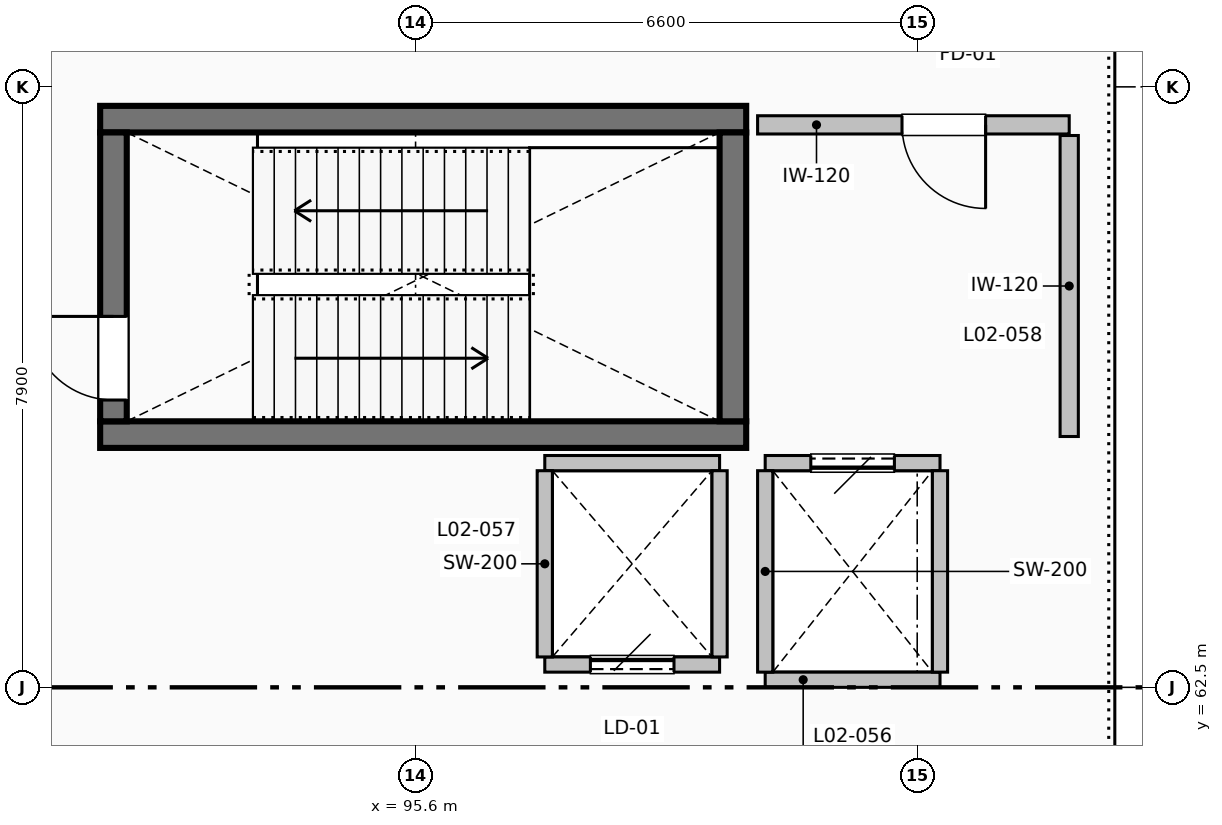
"""IFC4 building model, lengths in metres.
Left out: names, types, materials, properties, quantities, classifications, styles, units other than length and angle.
Written with IfcOpenShell. Run it as: python <this file> out.ifc"""

import sys

from ifc_helpers import new_model, si_unit, direction, frame, frame_2d, origin, place, context, subcontext, project, spatial, rectangle, extrude, element, fill, save


model = new_model("IFC4")
c1 = context("Model", 3, precision=1e-05, world=origin(), true_north=direction((0.0, 1.0)))
c2 = subcontext(c1, "Body", "Model", "MODEL_VIEW")
j1 = project(units=[si_unit("LENGTHUNIT", "METRE"), si_unit("PLANEANGLEUNIT", "RADIAN")], contexts=[c1])
p1 = place(None, origin())
s1 = spatial("IfcSite", under=j1, at=p1, CompositionType="ELEMENT")
p2 = place(p1, origin())
s2 = spatial("IfcBuilding", under=s1, at=p2, CompositionType="ELEMENT")
p3 = place(p2, frame((0.0, 0.0, 10.2)))
s3 = spatial("IfcBuildingStorey", under=s2, at=p3, CompositionType="ELEMENT", Elevation=10.2)
for number, where, z_axis, x_axis in (
    (1, (91.45, 65.825, 0.0), (0.0, 0.0, 1.0), (1.0, 0.0, 0.0)),
    (2, (99.95, 69.975, 0.0), (0.0, 0.0, 1.0), (-1.0, 0.0, 0.0)),
):
    element("IfcWall", number, at=place(p3, frame(where, z_axis=z_axis, x_axis=x_axis)), inside=s3, PredefinedType="SHEAR", context=c2, shape_type="SweptSolid", body=[
        extrude(rectangle(XDim=8.5, YDim=0.35, at=frame_2d((4.25, 0.0))), origin(), (0.0, 0.0, 1.0), 4.48),
    ])
p4 = place(p3, frame((91.625, 66.0, 0.0), z_axis=(0.0, 0.0, 1.0), x_axis=(0.0, 1.0, 0.0)))
e3 = element("IfcWall", 3, at=p4, inside=s3, PredefinedType="SHEAR", context=c2, shape_type="SweptSolid", body=[
    extrude(rectangle(XDim=3.8, YDim=0.35, at=frame_2d((1.9, 0.0))), origin(), (0.0, 0.0, 1.0), 4.48),
])
p5 = place(p4, frame((0.28, 0.0, 0.0)))
e4 = element("IfcOpeningElement", 4, at=p5, cuts=e3, PredefinedType="OPENING", context=c2, shape_type="SweptSolid", body=[
    extrude(rectangle(XDim=1.1, YDim=2.08, at=frame_2d((0.55, 1.04))), frame((0.0, 0.185, 0.0), z_axis=(0.0, -1.0, 0.0), x_axis=(1.0, 0.0, 0.0)), (0.0, 0.0, 1.0), 0.37),
])
p6 = place(p3, frame((99.775, 69.8, 0.0), z_axis=(0.0, 0.0, 1.0), x_axis=(0.0, -1.0, 0.0)))
e5 = element("IfcWall", 5, at=p6, inside=s3, PredefinedType="SHEAR", context=c2, shape_type="SweptSolid", body=[
    extrude(rectangle(XDim=3.8, YDim=0.35, at=frame_2d((1.9, 0.0))), origin(), (0.0, 0.0, 1.0), 4.48),
])
p7 = place(p3, frame((100.2, 62.6, 0.0), z_axis=(0.0, 0.0, 1.0), x_axis=(1.0, 0.0, 0.0)))
e6 = element("IfcWall", 6, at=p7, inside=s3, PredefinedType="PARTITIONING", context=c2, shape_type="SweptSolid", body=[
    extrude(rectangle(XDim=2.3, YDim=0.2, at=frame_2d((1.15, 0.0))), origin(), (0.0, 0.0, 1.0), 4.472),
])
p8 = place(p3, frame((102.5, 65.45, 0.0), z_axis=(0.0, 0.0, 1.0), x_axis=(-1.0, 0.0, 0.0)))
e7 = element("IfcWall", 7, at=p8, inside=s3, PredefinedType="PARTITIONING", context=c2, shape_type="SweptSolid", body=[
    extrude(rectangle(XDim=2.3, YDim=0.2, at=frame_2d((1.15, 0.0))), origin(), (0.0, 0.0, 1.0), 4.472),
])
p9 = place(p8, frame((0.6, 0.0, 0.0)))
e8 = element("IfcOpeningElement", 8, at=p9, cuts=e7, PredefinedType="OPENING", context=c2, shape_type="SweptSolid", body=[
    extrude(rectangle(XDim=1.1, YDim=2.15, at=frame_2d((0.55, 1.075))), frame((0.0, 0.11, 0.0), z_axis=(0.0, -1.0, 0.0), x_axis=(1.0, 0.0, 0.0)), (0.0, 0.0, 1.0), 0.22),
])
for number, where, z_axis, x_axis in (
    (9, (100.2, 62.7, 0.0), (0.0, 0.0, 1.0), (0.0, 1.0, 0.0)),
    (10, (102.5, 65.35, 0.0), (0.0, 0.0, 1.0), (0.0, -1.0, 0.0)),
):
    element("IfcWall", number, at=place(p3, frame(where, z_axis=z_axis, x_axis=x_axis)), inside=s3, PredefinedType="PARTITIONING", context=c2, shape_type="SweptSolid", body=[
        extrude(rectangle(XDim=2.65, YDim=0.2, at=frame_2d((1.325, 0.0))), origin(), (0.0, 0.0, 1.0), 4.472),
    ])
p10 = place(p3, frame((97.3, 62.8, 0.0), z_axis=(0.0, 0.0, 1.0), x_axis=(1.0, 0.0, 0.0)))
e11 = element("IfcWall", 11, at=p10, inside=s3, PredefinedType="PARTITIONING", context=c2, shape_type="SweptSolid", body=[
    extrude(rectangle(XDim=2.3, YDim=0.2, at=frame_2d((1.15, 0.0))), origin(), (0.0, 0.0, 1.0), 4.472),
])
p11 = place(p10, frame((0.6, 0.0, 0.0)))
e12 = element("IfcOpeningElement", 12, at=p11, cuts=e11, PredefinedType="OPENING", context=c2, shape_type="SweptSolid", body=[
    extrude(rectangle(XDim=1.1, YDim=2.15, at=frame_2d((0.55, 1.075))), frame((0.0, 0.11, 0.0), z_axis=(0.0, -1.0, 0.0), x_axis=(1.0, 0.0, 0.0)), (0.0, 0.0, 1.0), 0.22),
])
p12 = place(p3, frame((99.6, 65.45, 0.0), z_axis=(0.0, 0.0, 1.0), x_axis=(-1.0, 0.0, 0.0)))
e13 = element("IfcWall", 13, at=p12, inside=s3, PredefinedType="PARTITIONING", context=c2, shape_type="SweptSolid", body=[
    extrude(rectangle(XDim=2.3, YDim=0.2, at=frame_2d((1.15, 0.0))), origin(), (0.0, 0.0, 1.0), 4.472),
])
for number, where, z_axis, x_axis in (
    (14, (97.3, 62.9, 0.0), (0.0, 0.0, 1.0), (0.0, 1.0, 0.0)),
    (15, (99.6, 65.35, 0.0), (0.0, 0.0, 1.0), (0.0, -1.0, 0.0)),
):
    element("IfcWall", number, at=place(p3, frame(where, z_axis=z_axis, x_axis=x_axis)), inside=s3, PredefinedType="PARTITIONING", context=c2, shape_type="SweptSolid", body=[
        extrude(rectangle(XDim=2.45, YDim=0.2, at=frame_2d((1.225, 0.0))), origin(), (0.0, 0.0, 1.0), 4.472),
    ])
p13 = place(p3, frame((104.2, 69.9, 0.0), z_axis=(0.0, 0.0, 1.0), x_axis=(-1.0, 0.0, 0.0)))
e16 = element("IfcWall", 16, at=p13, inside=s3, PredefinedType="PARTITIONING", context=c2, shape_type="SweptSolid", body=[
    extrude(rectangle(XDim=4.1, YDim=0.24, at=frame_2d((2.05, 0.0))), origin(), (0.0, 0.0, 1.0), 4.472),
])
p14 = place(p13, frame((1.1, 0.0, 0.0)))
e17 = element("IfcOpeningElement", 17, at=p14, cuts=e16, PredefinedType="OPENING", context=c2, shape_type="SweptSolid", body=[
    extrude(rectangle(XDim=1.1, YDim=2.08, at=frame_2d((0.55, 1.04))), frame((0.0, 0.13, 0.0), z_axis=(0.0, -1.0, 0.0), x_axis=(1.0, 0.0, 0.0)), (0.0, 0.0, 1.0), 0.26),
])
p15 = place(p3, frame((104.2, 69.76, 0.0), z_axis=(0.0, 0.0, 1.0), x_axis=(0.0, -1.0, 0.0)))
e18 = element("IfcWall", 18, at=p15, inside=s3, PredefinedType="PARTITIONING", context=c2, shape_type="SweptSolid", body=[
    extrude(rectangle(XDim=3.96, YDim=0.24, at=frame_2d((1.98, 0.0))), origin(), (0.0, 0.0, 1.0), 4.472),
])
p16 = place(p5, origin())
e19 = element("IfcDoor", 19, at=p16, inside=s3, OperationType="SINGLE_SWING_RIGHT", PredefinedType="DOOR", context=c2, shape_type="SweptSolid", body=[
    extrude(rectangle(XDim=1.1, YDim=2.08, at=frame_2d((0.55, 1.04))), frame((0.0, 0.025, 0.0), z_axis=(0.0, -1.0, 0.0), x_axis=(1.0, 0.0, 0.0)), (0.0, 0.0, 1.0), 0.05),
])
fill(e4, e19)
p17 = place(p9, origin())
e20 = element("IfcDoor", 20, at=p17, inside=s3, OperationType="SLIDING_TO_LEFT", PredefinedType="DOOR", context=c2, shape_type="SweptSolid", body=[
    extrude(rectangle(XDim=1.1, YDim=2.15, at=frame_2d((0.55, 1.075))), frame((0.0, 0.025, 0.0), z_axis=(0.0, -1.0, 0.0), x_axis=(1.0, 0.0, 0.0)), (0.0, 0.0, 1.0), 0.05),
])
fill(e8, e20)
p18 = place(p11, origin())
e21 = element("IfcDoor", 21, at=p18, inside=s3, OperationType="SLIDING_TO_LEFT", PredefinedType="DOOR", context=c2, shape_type="SweptSolid", body=[
    extrude(rectangle(XDim=1.1, YDim=2.15, at=frame_2d((0.55, 1.075))), frame((0.0, 0.025, 0.0), z_axis=(0.0, -1.0, 0.0), x_axis=(1.0, 0.0, 0.0)), (0.0, 0.0, 1.0), 0.05),
])
fill(e12, e21)
p19 = place(p14, origin())
e22 = element("IfcDoor", 22, at=p19, inside=s3, OperationType="SINGLE_SWING_LEFT", PredefinedType="DOOR", context=c2, shape_type="SweptSolid", body=[
    extrude(rectangle(XDim=1.1, YDim=2.08, at=frame_2d((0.55, 1.04))), frame((0.0, 0.025, 0.0), z_axis=(0.0, -1.0, 0.0), x_axis=(1.0, 0.0, 0.0)), (0.0, 0.0, 1.0), 0.05),
])
fill(e17, e22)
save(model, sys.argv[1])
